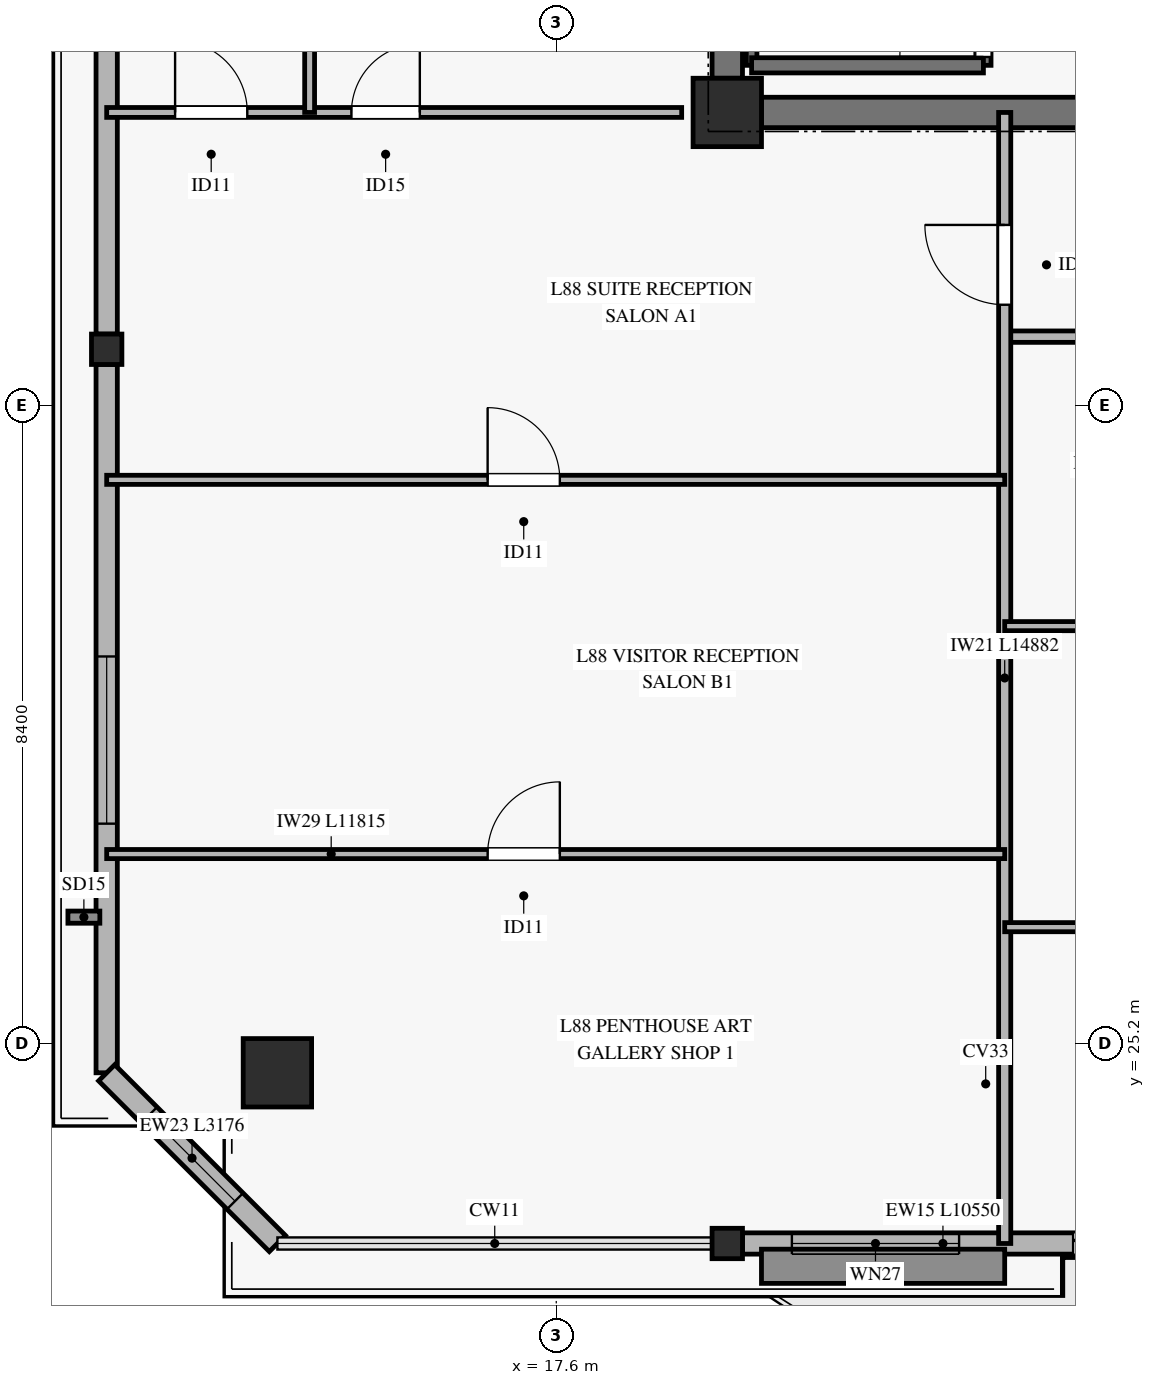
"""IFC4 building model, lengths in metres.
Left out: names, types, materials, properties, quantities, classifications, styles, units other than length and angle.
Written with IfcOpenShell. Run it as: python <this file> out.ifc"""

import sys

from ifc_helpers import new_model, si_unit, direction, frame, frame_2d, origin, origin_2d, place, context, subcontext, project, spatial, rectangle, hollow_rectangle, extrude, source, transform, mapped, element, fill, save


model = new_model("IFC4")
c1 = context("Model", 3, precision=1e-05, world=origin(), true_north=direction((0.0, 1.0)))
c2 = subcontext(c1, "Body", "Model", "MODEL_VIEW")
j1 = project(units=[si_unit("LENGTHUNIT", "METRE"), si_unit("PLANEANGLEUNIT", "RADIAN")], contexts=[c1])
p1 = place(None, origin())
s1 = spatial("IfcSite", under=j1, at=p1, CompositionType="ELEMENT")
p2 = place(p1, origin())
s2 = spatial("IfcBuilding", under=s1, at=p2, CompositionType="ELEMENT")
p3 = place(p2, frame((0.0, 0.0, 339.1)))
s3 = spatial("IfcBuildingStorey", under=s2, at=p3, CompositionType="ELEMENT", Elevation=339.1)
m1 = source(origin(), c2, "Body", "SweptSolid", [
    extrude(rectangle(XDim=0.9, YDim=0.9, at=origin_2d()), origin(), (0.0, 0.0, 1.0), 3.185),
])
p4 = place(p3, frame((19.85, 37.45, 0.0), z_axis=(0.0, 0.0, 1.0), x_axis=(1.0, 0.0, 0.0)))
e1 = element("IfcColumn", 1, at=p4, inside=s3, PredefinedType="PILASTER", context=c2, shape_type="MappedRepresentation", body=[
    mapped(m1, transform((0.0, 0.0, 0.0), x_axis=(1.0, 0.0, 0.0), y_axis=(0.0, 1.0, 0.0), z_axis=(0.0, 0.0, 1.0), scale=1.0)),
])
p5 = place(p3, frame((20.3, 37.45, 0.0), z_axis=(0.0, 0.0, 1.0), x_axis=(1.0, 0.0, 0.0)))
e2 = element("IfcWall", 2, at=p5, inside=s3, PredefinedType="SHEAR", context=c2, shape_type="SweptSolid", body=[
    extrude(rectangle(XDim=10.05, YDim=0.4, at=frame_2d((5.025, 0.0))), origin(), (0.0, 0.0, 1.0), 3.185),
])
p6 = place(p5, frame((4.25, 0.0, 0.0)))
e3 = element("IfcOpeningElement", 3, at=p6, cuts=e2, PredefinedType="OPENING", context=c2, shape_type="SweptSolid", body=[
    extrude(rectangle(XDim=1.2, YDim=2.15, at=frame_2d((0.6, 1.075))), frame((0.0, 0.21, 0.0), z_axis=(0.0, -1.0, 0.0), x_axis=(1.0, 0.0, 0.0)), (0.0, 0.0, 1.0), 0.42),
])
p7 = place(p3, frame((19.85, 37.9, 0.0), z_axis=(0.0, 0.0, 1.0), x_axis=(0.0, 1.0, 0.0)))
e4 = element("IfcWall", 4, at=p7, inside=s3, PredefinedType="SHEAR", context=c2, shape_type="SweptSolid", body=[
    extrude(rectangle(XDim=8.2, YDim=0.4, at=frame_2d((4.1, 0.0))), origin(), (0.0, 0.0, 1.0), 3.185),
])
m2 = source(origin(), c2, "Body", "SweptSolid", [
    extrude(hollow_rectangle(XDim=0.9, YDim=0.9, WallThickness=0.04, at=origin_2d()), origin(), (0.0, 0.0, 1.0), 3.185),
])
p8 = place(p3, frame((13.931, 24.814, 0.0), z_axis=(0.0, 0.0, 1.0), x_axis=(1.0, 0.0, 0.0)))
e5 = element("IfcColumn", 5, at=p8, inside=s3, PredefinedType="COLUMN", context=c2, shape_type="MappedRepresentation", body=[
    mapped(m2, transform((0.0, 0.0, 0.0), x_axis=(1.0, 0.0, 0.0), y_axis=(0.0, 1.0, 0.0), z_axis=(0.0, 0.0, 1.0), scale=1.0)),
])
m3 = source(origin(), c2, "Body", "SweptSolid", [
    extrude(hollow_rectangle(XDim=0.4, YDim=0.4, WallThickness=0.02, at=origin_2d()), origin(), (0.0, 0.0, 1.0), 3.185),
])
for number, where, z_axis, x_axis in (
    (6, (19.85, 22.568, 0.0), (0.0, 0.0, 1.0), (1.0, 0.0, 0.0)),
    (7, (11.685, 34.334, 0.0), (0.0, 0.0, 1.0), (1.0, 0.0, 0.0)),
):
    element("IfcColumn", number, at=place(p3, frame(where, z_axis=z_axis, x_axis=x_axis)), inside=s3, PredefinedType="COLUMN", context=c2, shape_type="MappedRepresentation", body=[
        mapped(m3, transform((0.0, 0.0, 0.0), x_axis=(1.0, 0.0, 0.0), y_axis=(0.0, 1.0, 0.0), z_axis=(0.0, 0.0, 1.0), scale=1.0)),
    ])
p9 = place(p3, frame((20.05, 22.568, 0.0), z_axis=(0.0, 0.0, 1.0), x_axis=(1.0, 0.0, 0.0)))
e8 = element("IfcWall", 8, at=p9, inside=s3, PredefinedType="SOLIDWALL", context=c2, shape_type="SweptSolid", body=[
    extrude(rectangle(XDim=10.55, YDim=0.28, at=frame_2d((5.275, 0.0))), origin(), (0.0, 0.0, 1.0), 2.815),
])
p10 = place(p9, frame((4.35, 0.0, 0.0)))
e9 = element("IfcOpeningElement", 9, at=p10, cuts=e8, PredefinedType="OPENING", context=c2, shape_type="SweptSolid", body=[
    extrude(rectangle(XDim=1.8, YDim=2.25, at=frame_2d((0.9, 1.125))), frame((0.0, 0.15, 0.0), z_axis=(0.0, -1.0, 0.0), x_axis=(1.0, 0.0, 0.0)), (0.0, 0.0, 1.0), 0.3),
])
p11 = place(p9, frame((0.65, 0.0, 0.45)))
e10 = element("IfcOpeningElement", 10, at=p11, cuts=e8, PredefinedType="OPENING", context=c2, shape_type="SweptSolid", body=[
    extrude(rectangle(XDim=2.2, YDim=2.1, at=frame_2d((1.1, 1.05))), frame((0.0, 0.15, 0.0), z_axis=(0.0, -1.0, 0.0), x_axis=(1.0, 0.0, 0.0)), (0.0, 0.0, 1.0), 0.3),
])
p12 = place(p9, frame((7.35, 0.0, 0.45)))
e11 = element("IfcOpeningElement", 11, at=p12, cuts=e8, PredefinedType="OPENING", context=c2, shape_type="SweptSolid", body=[
    extrude(rectangle(XDim=1.6, YDim=2.0, at=frame_2d((0.8, 1.0))), frame((0.0, 0.15, 0.0), z_axis=(0.0, -1.0, 0.0), x_axis=(1.0, 0.0, 0.0)), (0.0, 0.0, 1.0), 0.3),
])
p13 = place(p3, frame((11.685, 24.814, 0.0), z_axis=(0.0, 0.0, 1.0), x_axis=(0.0, 1.0, 0.0)))
e12 = element("IfcWall", 12, at=p13, inside=s3, PredefinedType="SOLIDWALL", context=c2, shape_type="SweptSolid", body=[
    extrude(rectangle(XDim=9.32, YDim=0.28, at=frame_2d((4.66, 0.0))), origin(), (0.0, 0.0, 1.0), 2.815),
])
p14 = place(p13, frame((3.278, 0.0, 0.45)))
e13 = element("IfcOpeningElement", 13, at=p14, cuts=e12, PredefinedType="OPENING", context=c2, shape_type="SweptSolid", body=[
    extrude(rectangle(XDim=2.2, YDim=2.1, at=frame_2d((1.1, 1.05))), frame((0.0, 0.15, 0.0), z_axis=(0.0, -1.0, 0.0), x_axis=(1.0, 0.0, 0.0)), (0.0, 0.0, 1.0), 0.3),
])
p15 = place(p3, frame((11.685, 34.534, 0.0), z_axis=(0.0, 0.0, 1.0), x_axis=(0.0, 1.0, 0.0)))
e14 = element("IfcWall", 14, at=p15, inside=s3, PredefinedType="SOLIDWALL", context=c2, shape_type="SweptSolid", body=[
    extrude(rectangle(XDim=9.32, YDim=0.28, at=frame_2d((4.66, 0.0))), origin(), (0.0, 0.0, 1.0), 2.815),
])
p16 = place(p15, frame((5.395, 0.0, 0.45)))
e15 = element("IfcOpeningElement", 15, at=p16, cuts=e14, PredefinedType="OPENING", context=c2, shape_type="SweptSolid", body=[
    extrude(rectangle(XDim=2.2, YDim=2.1, at=frame_2d((1.1, 1.05))), frame((0.0, 0.15, 0.0), z_axis=(0.0, -1.0, 0.0), x_axis=(1.0, 0.0, 0.0)), (0.0, 0.0, 1.0), 0.3),
])
p17 = place(p3, frame((11.685, 24.814, 0.0), z_axis=(0.0, 0.0, 1.0), x_axis=(0.707106781187, -0.707106781187, 0.0)))
e16 = element("IfcWall", 16, at=p17, inside=s3, PredefinedType="SOLIDWALL", context=c2, shape_type="SweptSolid", body=[
    extrude(rectangle(XDim=3.176, YDim=0.3, at=frame_2d((1.588, 0.0))), origin(), (0.0, 0.0, 1.0), 2.815),
])
p18 = place(p17, frame((0.788, 0.0, 0.45)))
e17 = element("IfcOpeningElement", 17, at=p18, cuts=e16, PredefinedType="OPENING", context=c2, shape_type="SweptSolid", body=[
    extrude(rectangle(XDim=1.6, YDim=2.0, at=frame_2d((0.8, 1.0))), frame((0.0, 0.16, 0.0), z_axis=(0.0, -1.0, 0.0), x_axis=(1.0, 0.0, 0.0)), (0.0, 0.0, 1.0), 0.32),
])
p19 = place(p3, frame((20.17, 38.07, 0.0), z_axis=(0.0, 0.0, 1.0), x_axis=(0.0, 1.0, 0.0)))
e18 = element("IfcWall", 18, at=p19, inside=s3, PredefinedType="SOLIDWALL", context=c2, shape_type="SweptSolid", body=[
    extrude(rectangle(XDim=7.25, YDim=0.14, at=frame_2d((3.625, 0.0))), origin(), (0.0, 0.0, 1.0), 3.4),
])
p20 = place(p3, frame((23.22, 38.07, 0.0), z_axis=(0.0, 0.0, 1.0), x_axis=(0.0, 1.0, 0.0)))
e19 = element("IfcWall", 19, at=p20, inside=s3, PredefinedType="SOLIDWALL", context=c2, shape_type="SweptSolid", body=[
    extrude(rectangle(XDim=7.25, YDim=0.2, at=frame_2d((3.625, 0.0))), origin(), (0.0, 0.0, 1.0), 3.4),
])
p21 = place(p20, frame((0.11, 0.0, 0.0)))
e20 = element("IfcOpeningElement", 20, at=p21, cuts=e19, PredefinedType="OPENING", context=c2, shape_type="SweptSolid", body=[
    extrude(rectangle(XDim=1.1, YDim=2.15, at=frame_2d((0.55, 1.075))), frame((0.0, 0.11, 0.0), z_axis=(0.0, -1.0, 0.0), x_axis=(1.0, 0.0, 0.0)), (0.0, 0.0, 1.0), 0.22),
])
p22 = place(p3, frame((20.17, 38.07, 0.0), z_axis=(0.0, 0.0, 1.0), x_axis=(1.0, 0.0, 0.0)))
e21 = element("IfcWall", 21, at=p22, inside=s3, PredefinedType="SOLIDWALL", context=c2, shape_type="SweptSolid", body=[
    extrude(rectangle(XDim=3.05, YDim=0.2, at=frame_2d((1.525, 0.0))), origin(), (0.0, 0.0, 1.0), 3.4),
])
p23 = place(p3, frame((23.5, 34.5, 0.0), z_axis=(0.0, 0.0, 1.0), x_axis=(1.0, 0.0, 0.0)))
e22 = element("IfcWall", 22, at=p23, inside=s3, PredefinedType="PARTITIONING", context=c2, shape_type="SweptSolid", body=[
    extrude(rectangle(XDim=20.8, YDim=0.15, at=frame_2d((10.4, 0.0))), origin(), (0.0, 0.0, 1.0), 2.47),
])
p24 = place(p23, frame((4.767, 0.0, 0.0)))
e23 = element("IfcOpeningElement", 23, at=p24, cuts=e22, PredefinedType="OPENING", context=c2, shape_type="SweptSolid", body=[
    extrude(rectangle(XDim=1.05, YDim=2.15, at=frame_2d((0.525, 1.075))), frame((0.0, 0.085, 0.0), z_axis=(0.0, -1.0, 0.0), x_axis=(1.0, 0.0, 0.0)), (0.0, 0.0, 1.0), 0.17),
])
p25 = place(p23, frame((16.025, 0.0, 0.0)))
e24 = element("IfcOpeningElement", 24, at=p25, cuts=e22, PredefinedType="OPENING", context=c2, shape_type="SweptSolid", body=[
    extrude(rectangle(XDim=1.05, YDim=2.15, at=frame_2d((0.525, 1.075))), frame((0.0, 0.085, 0.0), z_axis=(0.0, -1.0, 0.0), x_axis=(1.0, 0.0, 0.0)), (0.0, 0.0, 1.0), 0.17),
])
p26 = place(p3, frame((23.5, 22.568, 0.0), z_axis=(0.0, 0.0, 1.0), x_axis=(0.0, 1.0, 0.0)))
e25 = element("IfcWall", 25, at=p26, inside=s3, PredefinedType="PARTITIONING", context=c2, shape_type="SweptSolid", body=[
    extrude(rectangle(XDim=14.882, YDim=0.16, at=frame_2d((7.441, 0.0))), origin(), (0.0, 0.0, 1.0), 2.77),
])
p27 = place(p26, frame((12.352, 0.0, 0.0)))
e26 = element("IfcOpeningElement", 26, at=p27, cuts=e25, PredefinedType="OPENING", context=c2, shape_type="SweptSolid", body=[
    extrude(rectangle(XDim=1.05, YDim=2.15, at=frame_2d((0.525, 1.075))), frame((0.0, 0.09, 0.0), z_axis=(0.0, -1.0, 0.0), x_axis=(1.0, 0.0, 0.0)), (0.0, 0.0, 1.0), 0.18),
])
p28 = place(p3, frame((11.685, 27.692, 0.0), z_axis=(0.0, 0.0, 1.0), x_axis=(1.0, 0.0, 0.0)))
e27 = element("IfcWall", 27, at=p28, inside=s3, PredefinedType="PARTITIONING", context=c2, shape_type="SweptSolid", body=[
    extrude(rectangle(XDim=11.815, YDim=0.12, at=frame_2d((5.907, 0.0))), origin(), (0.0, 0.0, 1.0), 2.47),
])
p29 = place(p28, frame((5.012, 0.0, 0.0)))
e28 = element("IfcOpeningElement", 28, at=p29, cuts=e27, PredefinedType="OPENING", context=c2, shape_type="SweptSolid", body=[
    extrude(rectangle(XDim=0.95, YDim=2.1, at=frame_2d((0.475, 1.05))), frame((0.0, 0.07, 0.0), z_axis=(0.0, -1.0, 0.0), x_axis=(1.0, 0.0, 0.0)), (0.0, 0.0, 1.0), 0.14),
])
p30 = place(p3, frame((11.685, 32.616, 0.0), z_axis=(0.0, 0.0, 1.0), x_axis=(1.0, 0.0, 0.0)))
e29 = element("IfcWall", 29, at=p30, inside=s3, PredefinedType="PARTITIONING", context=c2, shape_type="SweptSolid", body=[
    extrude(rectangle(XDim=11.815, YDim=0.12, at=frame_2d((5.907, 0.0))), origin(), (0.0, 0.0, 1.0), 2.47),
])
p31 = place(p30, frame((5.012, 0.0, 0.0)))
e30 = element("IfcOpeningElement", 30, at=p31, cuts=e29, PredefinedType="OPENING", context=c2, shape_type="SweptSolid", body=[
    extrude(rectangle(XDim=0.95, YDim=2.1, at=frame_2d((0.475, 1.05))), frame((0.0, 0.07, 0.0), z_axis=(0.0, -1.0, 0.0), x_axis=(1.0, 0.0, 0.0)), (0.0, 0.0, 1.0), 0.14),
])
p32 = place(p3, frame((23.5, 26.73, 0.0), z_axis=(0.0, 0.0, 1.0), x_axis=(1.0, 0.0, 0.0)))
e31 = element("IfcWall", 31, at=p32, inside=s3, PredefinedType="PARTITIONING", context=c2, shape_type="SweptSolid", body=[
    extrude(rectangle(XDim=12.1, YDim=0.12, at=frame_2d((6.05, 0.0))), origin(), (0.0, 0.0, 1.0), 2.47),
])
p33 = place(p32, frame((5.006, 0.0, 0.0)))
e32 = element("IfcOpeningElement", 32, at=p33, cuts=e31, PredefinedType="OPENING", context=c2, shape_type="SweptSolid", body=[
    extrude(rectangle(XDim=0.95, YDim=2.1, at=frame_2d((0.475, 1.05))), frame((0.0, 0.07, 0.0), z_axis=(0.0, -1.0, 0.0), x_axis=(1.0, 0.0, 0.0)), (0.0, 0.0, 1.0), 0.14),
])
p34 = place(p3, frame((23.5, 30.691, 0.0), z_axis=(0.0, 0.0, 1.0), x_axis=(1.0, 0.0, 0.0)))
e33 = element("IfcWall", 33, at=p34, inside=s3, PredefinedType="PARTITIONING", context=c2, shape_type="SweptSolid", body=[
    extrude(rectangle(XDim=12.1, YDim=0.12, at=frame_2d((6.05, 0.0))), origin(), (0.0, 0.0, 1.0), 2.47),
])
p35 = place(p34, frame((5.006, 0.0, 0.0)))
e34 = element("IfcOpeningElement", 34, at=p35, cuts=e33, PredefinedType="OPENING", context=c2, shape_type="SweptSolid", body=[
    extrude(rectangle(XDim=0.95, YDim=2.1, at=frame_2d((0.475, 1.05))), frame((0.0, 0.07, 0.0), z_axis=(0.0, -1.0, 0.0), x_axis=(1.0, 0.0, 0.0)), (0.0, 0.0, 1.0), 0.14),
])
p36 = place(p3, frame((11.685, 37.45, 0.0), z_axis=(0.0, 0.0, 1.0), x_axis=(1.0, 0.0, 0.0)))
e35 = element("IfcWall", 35, at=p36, inside=s3, PredefinedType="PARTITIONING", context=c2, shape_type="SweptSolid", body=[
    extrude(rectangle(XDim=7.565, YDim=0.13, at=frame_2d((3.782, 0.0))), origin(), (0.0, 0.0, 1.0), 2.82),
])
p37 = place(p36, frame((0.9, 0.0, 0.0)))
e36 = element("IfcOpeningElement", 36, at=p37, cuts=e35, PredefinedType="OPENING", context=c2, shape_type="SweptSolid", body=[
    extrude(rectangle(XDim=0.95, YDim=2.1, at=frame_2d((0.475, 1.05))), frame((0.0, 0.075, 0.0), z_axis=(0.0, -1.0, 0.0), x_axis=(1.0, 0.0, 0.0)), (0.0, 0.0, 1.0), 0.15),
])
p38 = place(p36, frame((3.22, 0.0, 0.0)))
e37 = element("IfcOpeningElement", 37, at=p38, cuts=e35, PredefinedType="OPENING", context=c2, shape_type="SweptSolid", body=[
    extrude(rectangle(XDim=0.9, YDim=2.1, at=frame_2d((0.45, 1.05))), frame((0.0, 0.075, 0.0), z_axis=(0.0, -1.0, 0.0), x_axis=(1.0, 0.0, 0.0)), (0.0, 0.0, 1.0), 0.15),
])
p39 = place(p3, frame((14.355, 37.45, 0.0), z_axis=(0.0, 0.0, 1.0), x_axis=(0.0, 1.0, 0.0)))
e38 = element("IfcWall", 38, at=p39, inside=s3, PredefinedType="PARTITIONING", context=c2, shape_type="SweptSolid", body=[
    extrude(rectangle(XDim=8.8, YDim=0.13, at=frame_2d((4.4, 0.0))), origin(), (0.0, 0.0, 1.0), 3.185),
])
m4 = source(origin(), c2, "Body", "SweptSolid", [
    extrude(rectangle(XDim=1.8, YDim=2.25, at=frame_2d((0.9, 1.125))), frame((0.0, 0.025, 0.0), z_axis=(0.0, -1.0, 0.0), x_axis=(1.0, 0.0, 0.0)), (0.0, 0.0, 1.0), 0.05),
])
p40 = place(p10, origin())
e39 = element("IfcDoor", 39, at=p40, inside=s3, OperationType="SLIDING_TO_LEFT", PredefinedType="DOOR", context=c2, shape_type="MappedRepresentation", body=[
    mapped(m4, transform((0.0, 0.0, 0.0), x_axis=(1.0, 0.0, 0.0), y_axis=(0.0, 1.0, 0.0), z_axis=(0.0, 0.0, 1.0), scale=1.0)),
])
fill(e9, e39)
m5 = source(origin(), c2, "Body", "SweptSolid", [
    extrude(rectangle(XDim=2.2, YDim=2.1, at=frame_2d((1.1, 1.05))), frame((0.0, 0.03, 0.0), z_axis=(0.0, -1.0, 0.0), x_axis=(1.0, 0.0, 0.0)), (0.0, 0.0, 1.0), 0.06),
])
p41 = place(p11, origin())
e40 = element("IfcWindow", 40, at=p41, inside=s3, PartitioningType="SINGLE_PANEL", PredefinedType="WINDOW", context=c2, shape_type="MappedRepresentation", body=[
    mapped(m5, transform((0.0, 0.0, 0.0), x_axis=(1.0, 0.0, 0.0), y_axis=(0.0, 1.0, 0.0), z_axis=(0.0, 0.0, 1.0), scale=1.0)),
])
fill(e10, e40)
p42 = place(p14, origin())
e41 = element("IfcWindow", 41, at=p42, inside=s3, PartitioningType="SINGLE_PANEL", PredefinedType="WINDOW", context=c2, shape_type="MappedRepresentation", body=[
    mapped(m5, transform((0.0, 0.0, 0.0), x_axis=(1.0, 0.0, 0.0), y_axis=(0.0, 1.0, 0.0), z_axis=(0.0, 0.0, 1.0), scale=1.0)),
])
fill(e13, e41)
m6 = source(origin(), c2, "Body", "SweptSolid", [
    extrude(rectangle(XDim=1.6, YDim=2.0, at=frame_2d((0.8, 1.0))), frame((0.0, 0.03, 0.0), z_axis=(0.0, -1.0, 0.0), x_axis=(1.0, 0.0, 0.0)), (0.0, 0.0, 1.0), 0.06),
])
p43 = place(p18, origin())
e42 = element("IfcWindow", 42, at=p43, inside=s3, PartitioningType="SINGLE_PANEL", PredefinedType="WINDOW", context=c2, shape_type="MappedRepresentation", body=[
    mapped(m6, transform((0.0, 0.0, 0.0), x_axis=(1.0, 0.0, 0.0), y_axis=(0.0, 1.0, 0.0), z_axis=(0.0, 0.0, 1.0), scale=1.0)),
])
fill(e17, e42)
m7 = source(origin(), c2, "Body", "SweptSolid", [
    extrude(rectangle(XDim=1.1, YDim=2.15, at=frame_2d((0.55, 1.075))), frame((0.0, 0.025, 0.0), z_axis=(0.0, -1.0, 0.0), x_axis=(1.0, 0.0, 0.0)), (0.0, 0.0, 1.0), 0.05),
])
p44 = place(p21, origin())
e43 = element("IfcDoor", 43, at=p44, inside=s3, OperationType="SINGLE_SWING_LEFT", PredefinedType="DOOR", context=c2, shape_type="MappedRepresentation", body=[
    mapped(m7, transform((0.0, 0.0, 0.0), x_axis=(1.0, 0.0, 0.0), y_axis=(0.0, 1.0, 0.0), z_axis=(0.0, 0.0, 1.0), scale=1.0)),
])
fill(e20, e43)
m8 = source(origin(), c2, "Body", "SweptSolid", [
    extrude(rectangle(XDim=1.05, YDim=2.15, at=frame_2d((0.525, 1.075))), frame((0.0, 0.025, 0.0), z_axis=(0.0, -1.0, 0.0), x_axis=(1.0, 0.0, 0.0)), (0.0, 0.0, 1.0), 0.05),
])
p45 = place(p27, origin())
e44 = element("IfcDoor", 44, at=p45, inside=s3, OperationType="SINGLE_SWING_RIGHT", PredefinedType="DOOR", context=c2, shape_type="MappedRepresentation", body=[
    mapped(m8, transform((0.0, 0.0, 0.0), x_axis=(1.0, 0.0, 0.0), y_axis=(0.0, 1.0, 0.0), z_axis=(0.0, 0.0, 1.0), scale=1.0)),
])
fill(e26, e44)
m9 = source(origin(), c2, "Body", "SweptSolid", [
    extrude(rectangle(XDim=0.95, YDim=2.1, at=frame_2d((0.475, 1.05))), frame((0.0, 0.025, 0.0), z_axis=(0.0, -1.0, 0.0), x_axis=(1.0, 0.0, 0.0)), (0.0, 0.0, 1.0), 0.05),
])
p46 = place(p31, origin())
e45 = element("IfcDoor", 45, at=p46, inside=s3, OperationType="SINGLE_SWING_LEFT", PredefinedType="DOOR", context=c2, shape_type="MappedRepresentation", body=[
    mapped(m9, transform((0.0, 0.0, 0.0), x_axis=(1.0, 0.0, 0.0), y_axis=(0.0, 1.0, 0.0), z_axis=(0.0, 0.0, 1.0), scale=1.0)),
])
fill(e30, e45)
p47 = place(p29, origin())
e46 = element("IfcDoor", 46, at=p47, inside=s3, OperationType="SINGLE_SWING_RIGHT", PredefinedType="DOOR", context=c2, shape_type="MappedRepresentation", body=[
    mapped(m9, transform((0.0, 0.0, 0.0), x_axis=(1.0, 0.0, 0.0), y_axis=(0.0, 1.0, 0.0), z_axis=(0.0, 0.0, 1.0), scale=1.0)),
])
fill(e28, e46)
p48 = place(p37, origin())
e47 = element("IfcDoor", 47, at=p48, inside=s3, OperationType="SINGLE_SWING_LEFT", PredefinedType="DOOR", context=c2, shape_type="MappedRepresentation", body=[
    mapped(m9, transform((0.0, 0.0, 0.0), x_axis=(1.0, 0.0, 0.0), y_axis=(0.0, 1.0, 0.0), z_axis=(0.0, 0.0, 1.0), scale=1.0)),
])
fill(e36, e47)
m10 = source(origin(), c2, "Body", "SweptSolid", [
    extrude(rectangle(XDim=0.9, YDim=2.1, at=frame_2d((0.45, 1.05))), frame((0.0, 0.025, 0.0), z_axis=(0.0, -1.0, 0.0), x_axis=(1.0, 0.0, 0.0)), (0.0, 0.0, 1.0), 0.05),
])
p49 = place(p38, origin())
e48 = element("IfcDoor", 48, at=p49, inside=s3, OperationType="SINGLE_SWING_RIGHT", PredefinedType="DOOR", context=c2, shape_type="MappedRepresentation", body=[
    mapped(m10, transform((0.0, 0.0, 0.0), x_axis=(1.0, 0.0, 0.0), y_axis=(0.0, 1.0, 0.0), z_axis=(0.0, 0.0, 1.0), scale=1.0)),
])
fill(e37, e48)
save(model, sys.argv[1])
